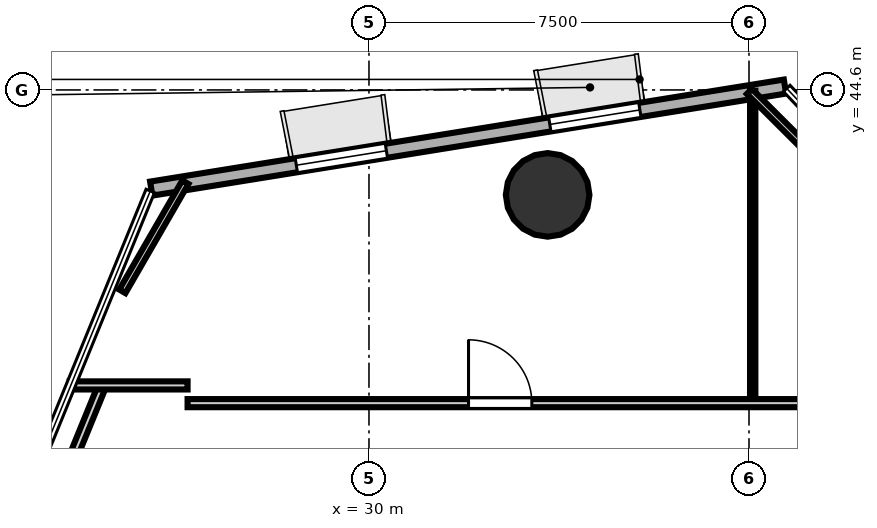
"""IFC4 building model, lengths in metres.
Left out: names, types, materials, properties, quantities, classifications, styles, units other than length and angle.
Written with IfcOpenShell. Run it as: python <this file> out.ifc"""

import sys

from ifc_helpers import new_model, si_unit, direction, frame, frame_2d, origin, origin_2d, place, context, subcontext, project, spatial, rectangle, hollow_circle, extrude, element, fill, save


model = new_model("IFC4")
c1 = context("Model", 3, precision=1e-05, world=origin(), true_north=direction((0.0, 1.0)))
c2 = subcontext(c1, "Body", "Model", "MODEL_VIEW")
j1 = project(units=[si_unit("LENGTHUNIT", "METRE"), si_unit("PLANEANGLEUNIT", "RADIAN")], contexts=[c1])
p1 = place(None, origin())
s1 = spatial("IfcSite", under=j1, at=p1, CompositionType="ELEMENT")
p2 = place(p1, origin())
s2 = spatial("IfcBuilding", under=s1, at=p2, CompositionType="ELEMENT")
p3 = place(p2, frame((0.0, 0.0, 52.5)))
s3 = spatial("IfcBuildingStorey", under=s2, at=p3, CompositionType="ELEMENT", Elevation=52.5)
p4 = place(p3, frame((33.526, 42.529, -0.23), z_axis=(0.0, 0.0, 1.0), x_axis=(1.0, 0.0, 0.0)))
e1 = element("IfcColumn", 1, at=p4, inside=s3, PredefinedType="COLUMN", context=c2, shape_type="SweptSolid", body=[
    extrude(hollow_circle(Radius=0.825, WallThickness=0.04, at=origin_2d()), origin(), (0.0, 0.0, 1.0), 3.93),
])
p5 = place(p3, frame((38.21, 44.667, 0.0), z_axis=(0.0, 0.0, 1.0), x_axis=(-0.987285743685, -0.158955529366, 0.0)))
e2 = element("IfcWall", 2, at=p5, inside=s3, PredefinedType="SOLIDWALL", context=c2, shape_type="SweptSolid", body=[
    extrude(rectangle(XDim=12.668, YDim=0.28, at=frame_2d((6.334, 0.0))), origin(), (0.0, 0.0, 1.0), 3.52),
])
p6 = place(p5, frame((2.9, 0.0, 0.85)))
e3 = element("IfcOpeningElement", 3, at=p6, cuts=e2, PredefinedType="OPENING", context=c2, shape_type="SweptSolid", body=[
    extrude(rectangle(XDim=1.8, YDim=2.1, at=frame_2d((0.9, 1.05))), frame((0.0, 0.15, 0.0), z_axis=(0.0, -1.0, 0.0), x_axis=(1.0, 0.0, 0.0)), (0.0, 0.0, 1.0), 0.3),
])
p7 = place(p5, frame((7.968, 0.0, 0.85)))
e4 = element("IfcOpeningElement", 4, at=p7, cuts=e2, PredefinedType="OPENING", context=c2, shape_type="SweptSolid", body=[
    extrude(rectangle(XDim=1.8, YDim=2.1, at=frame_2d((0.9, 1.05))), frame((0.0, 0.15, 0.0), z_axis=(0.0, -1.0, 0.0), x_axis=(1.0, 0.0, 0.0)), (0.0, 0.0, 1.0), 0.3),
])
p8 = place(p3, frame((23.746, 36.346, 0.0), z_axis=(0.0, 0.0, 1.0), x_axis=(0.378431081054, 0.925629470627, 0.0)))
e5 = element("IfcWall", 5, at=p8, inside=s3, PredefinedType="PARTITIONING", context=c2, shape_type="SweptSolid", body=[
    extrude(rectangle(XDim=2.639, YDim=0.16, at=frame_2d((1.319, 0.0))), origin(), (0.0, 0.0, 1.0), 2.84),
])
p9 = place(p3, frame((24.094, 38.769, 0.0), z_axis=(0.0, 0.0, 1.0), x_axis=(1.0, 0.0, 0.0)))
e6 = element("IfcWall", 6, at=p9, inside=s3, PredefinedType="PARTITIONING", context=c2, shape_type="SweptSolid", body=[
    extrude(rectangle(XDim=2.325, YDim=0.16, at=frame_2d((1.163, 0.0))), origin(), (0.0, 0.0, 1.0), 2.84),
])
p10 = place(p3, frame((26.42, 38.419, 0.0), z_axis=(0.0, 0.0, 1.0), x_axis=(1.0, 0.0, 0.0)))
e7 = element("IfcWall", 7, at=p10, inside=s3, PredefinedType="PARTITIONING", context=c2, shape_type="SweptSolid", body=[
    extrude(rectangle(XDim=15.783, YDim=0.16, at=frame_2d((7.892, 0.0))), origin(), (0.0, 0.0, 1.0), 2.798),
])
p11 = place(p10, frame((5.544, 0.0, 0.0)))
e8 = element("IfcOpeningElement", 8, at=p11, cuts=e7, PredefinedType="OPENING", context=c2, shape_type="SweptSolid", body=[
    extrude(rectangle(XDim=1.25, YDim=2.2, at=frame_2d((0.625, 1.1))), frame((0.0, 0.09, 0.0), z_axis=(0.0, -1.0, 0.0), x_axis=(1.0, 0.0, 0.0)), (0.0, 0.0, 1.0), 0.18),
])
p12 = place(p3, frame((37.573, 38.53, 0.0), z_axis=(0.0, 0.0, 1.0), x_axis=(0.0, 1.0, 0.0)))
e9 = element("IfcWall", 9, at=p12, inside=s3, PredefinedType="PARTITIONING", context=c2, shape_type="SweptSolid", body=[
    extrude(rectangle(XDim=6.054, YDim=0.105, at=frame_2d((3.027, 0.0))), origin(), (0.0, 0.0, 1.0), 2.798),
])
p13 = place(p3, frame((37.508, 44.57, 0.0), z_axis=(0.0, 0.0, 1.0), x_axis=(0.707905248795, -0.706307410926, 0.0)))
e10 = element("IfcWall", 10, at=p13, inside=s3, PredefinedType="PARTITIONING", context=c2, shape_type="SweptSolid", body=[
    extrude(rectangle(XDim=11.612, YDim=0.14, at=frame_2d((5.806, 0.0))), origin(), (0.0, 0.0, 1.0), 2.84),
])
p14 = place(p3, frame((25.133, 40.625, 0.0), z_axis=(0.0, 0.0, 1.0), x_axis=(0.500087857052, 0.865974673549, 0.0)))
e11 = element("IfcWall", 11, at=p14, inside=s3, PredefinedType="PARTITIONING", context=c2, shape_type="SweptSolid", body=[
    extrude(rectangle(XDim=2.487, YDim=0.14, at=frame_2d((1.243, 0.0))), origin(), (0.0, 0.0, 1.0), 2.84),
])
p15 = place(p11, origin())
e12 = element("IfcDoor", 12, at=p15, inside=s3, OperationType="SINGLE_SWING_LEFT", PredefinedType="DOOR", context=c2, shape_type="SweptSolid", body=[
    extrude(rectangle(XDim=1.25, YDim=2.2, at=frame_2d((0.625, 1.1))), frame((0.0, 0.025, 0.0), z_axis=(0.0, -1.0, 0.0), x_axis=(1.0, 0.0, 0.0)), (0.0, 0.0, 1.0), 0.05),
])
fill(e8, e12)
p16 = place(p6, origin())
e13 = element("IfcWindow", 13, at=p16, inside=s3, PartitioningType="SINGLE_PANEL", PredefinedType="WINDOW", context=c2, shape_type="SweptSolid", body=[
    extrude(rectangle(XDim=1.8, YDim=2.1, at=frame_2d((0.9, 1.05))), frame((0.0, 0.03, 0.0), z_axis=(0.0, -1.0, 0.0), x_axis=(1.0, 0.0, 0.0)), (0.0, 0.0, 1.0), 0.06),
])
fill(e3, e13)
p17 = place(p7, origin())
e14 = element("IfcWindow", 14, at=p17, inside=s3, PartitioningType="SINGLE_PANEL", PredefinedType="WINDOW", context=c2, shape_type="SweptSolid", body=[
    extrude(rectangle(XDim=1.8, YDim=2.1, at=frame_2d((0.9, 1.05))), frame((0.0, 0.03, 0.0), z_axis=(0.0, -1.0, 0.0), x_axis=(1.0, 0.0, 0.0)), (0.0, 0.0, 1.0), 0.06),
])
fill(e4, e14)
save(model, sys.argv[1])
